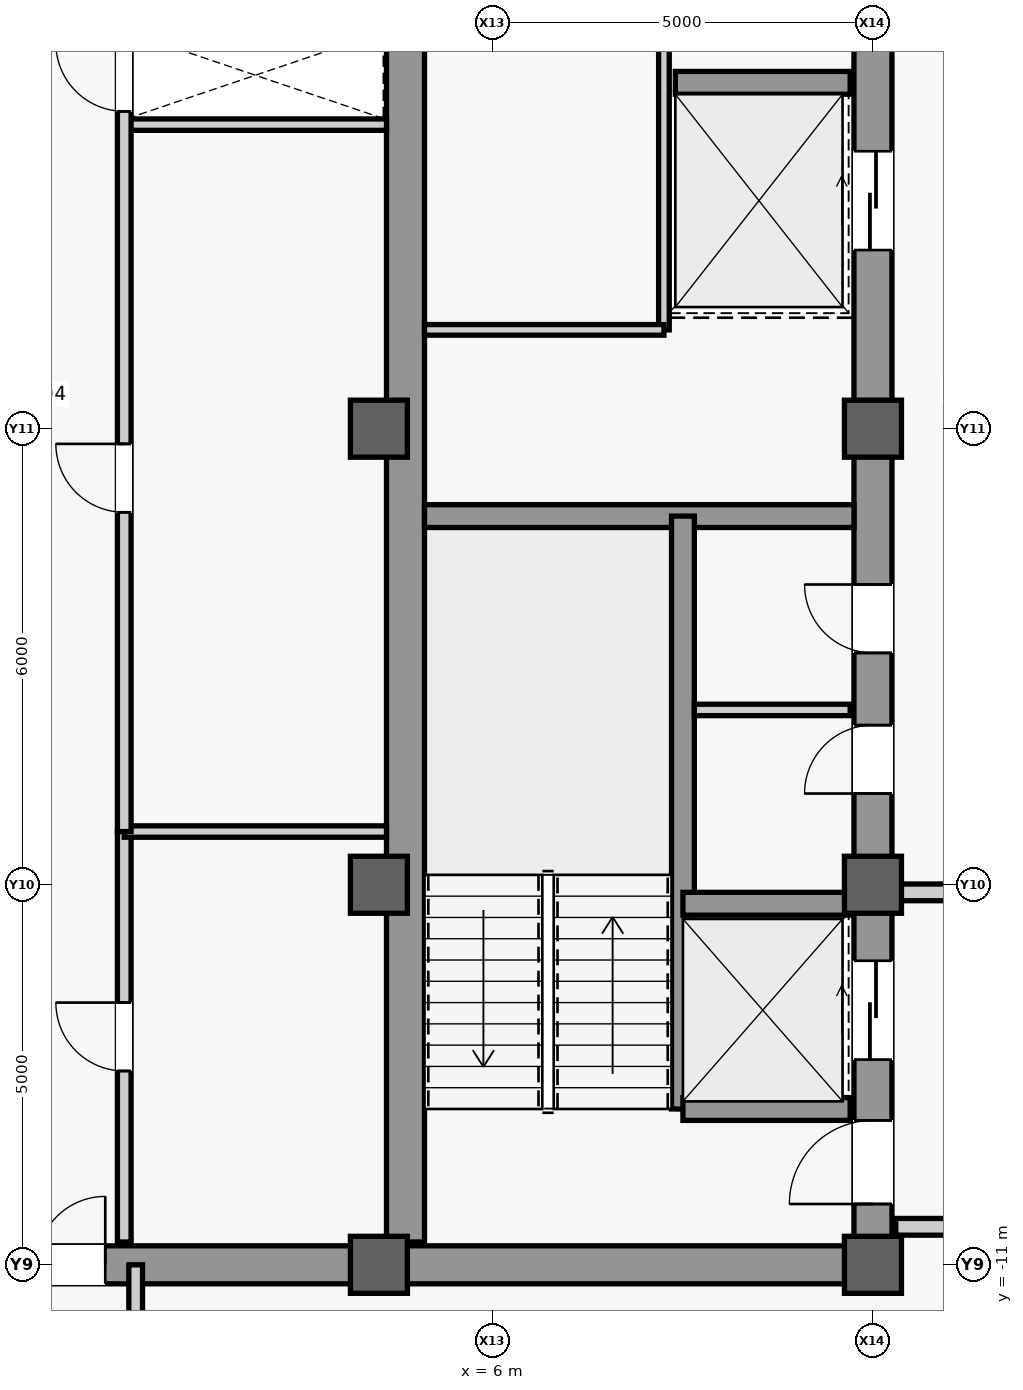
"""IFC4 building model, lengths in metres.
Left out: names, types, materials, properties, quantities, classifications, styles, units other than length and angle.
Written with IfcOpenShell. Run it as: python <this file> out.ifc"""

import sys

from ifc_helpers import new_model, si_unit, direction, frame, frame_2d, origin, origin_2d, place, context, subcontext, project, spatial, rectangle, extrude, source, transform, mapped, element, fill, save


model = new_model("IFC4")
c1 = context("Model", 3, precision=1e-05, world=origin(), true_north=direction((0.0, 1.0)))
c2 = subcontext(c1, "Body", "Model", "MODEL_VIEW")
j1 = project(units=[si_unit("LENGTHUNIT", "METRE"), si_unit("PLANEANGLEUNIT", "RADIAN")], contexts=[c1])
p1 = place(None, origin())
s1 = spatial("IfcSite", under=j1, at=p1, CompositionType="ELEMENT")
p2 = place(p1, origin())
s2 = spatial("IfcBuilding", under=s1, at=p2, CompositionType="ELEMENT")
p3 = place(p2, frame((0.0, 0.0, 330.3)))
s3 = spatial("IfcBuildingStorey", under=s2, at=p3, CompositionType="ELEMENT", Elevation=330.3)
m1 = source(origin(), c2, "Body", "SweptSolid", [
    extrude(rectangle(XDim=22.0, YDim=0.5, at=frame_2d((11.0, 0.0))), origin(), (0.0, 0.0, 1.0), 3.74),
])
p4 = place(p3, frame((11.0, -11.0, 0.0), z_axis=(0.0, 0.0, 1.0), x_axis=(0.0, 1.0, 0.0)))
e1 = element("IfcWall", 1, at=p4, inside=s3, PredefinedType="SHEAR", context=c2, shape_type="MappedRepresentation", body=[
    mapped(m1, transform((0.0, 0.0, 0.0), scale=1.0)),
])
m2 = source(origin(), c2, "Body", "SweptSolid", [
    extrude(rectangle(XDim=1.1, YDim=2.2, at=frame_2d((0.55, 1.1))), frame((0.0, 0.26, 0.0), z_axis=(0.0, -1.0, 0.0), x_axis=(1.0, 0.0, 0.0)), (0.0, 0.0, 1.0), 0.52),
])
p5 = place(p4, frame((0.8, 0.0, 0.0)))
e2 = element("IfcOpeningElement", 2, at=p5, cuts=e1, PredefinedType="OPENING", context=c2, shape_type="MappedRepresentation", body=[
    mapped(m2, transform((0.0, 0.0, 0.0), scale=1.0)),
])
m3 = source(origin(), c2, "Body", "SweptSolid", [
    extrude(rectangle(XDim=0.9, YDim=2.15, at=frame_2d((0.45, 1.075))), frame((0.0, 0.26, 0.0), z_axis=(0.0, -1.0, 0.0), x_axis=(1.0, 0.0, 0.0)), (0.0, 0.0, 1.0), 0.52),
])
p6 = place(p4, frame((6.2, 0.0, 0.0)))
e3 = element("IfcOpeningElement", 3, at=p6, cuts=e1, PredefinedType="OPENING", context=c2, shape_type="MappedRepresentation", body=[
    mapped(m3, transform((0.0, 0.0, 0.0), scale=1.0)),
])
p7 = place(p4, frame((8.05, 0.0, 0.0)))
e4 = element("IfcOpeningElement", 4, at=p7, cuts=e1, PredefinedType="OPENING", context=c2, shape_type="MappedRepresentation", body=[
    mapped(m3, transform((0.0, 0.0, 0.0), scale=1.0)),
])
m4 = source(origin(), c2, "Body", "SweptSolid", [
    extrude(rectangle(XDim=1.2, YDim=2.3, at=frame_2d((0.6, 1.15))), frame((0.0, 0.26, 0.0), z_axis=(0.0, -1.0, 0.0), x_axis=(1.0, 0.0, 0.0)), (0.0, 0.0, 1.0), 0.52),
])
p8 = place(p4, frame((17.6, 0.0, 0.0)))
e5 = element("IfcOpeningElement", 5, at=p8, cuts=e1, PredefinedType="OPENING", context=c2, shape_type="MappedRepresentation", body=[
    mapped(m4, transform((0.0, 0.0, 0.0), scale=1.0)),
])
p9 = place(p4, frame((19.6, 0.0, 0.0)))
e6 = element("IfcOpeningElement", 6, at=p9, cuts=e1, PredefinedType="OPENING", context=c2, shape_type="MappedRepresentation", body=[
    mapped(m4, transform((0.0, 0.0, 0.0), scale=1.0)),
])
m5 = source(origin(), c2, "Body", "SweptSolid", [
    extrude(rectangle(XDim=1.3, YDim=2.3, at=frame_2d((0.65, 1.15))), frame((0.0, 0.26, 0.0), z_axis=(0.0, -1.0, 0.0), x_axis=(1.0, 0.0, 0.0)), (0.0, 0.0, 1.0), 0.52),
])
p10 = place(p4, frame((2.7, 0.0, 0.0)))
e7 = element("IfcOpeningElement", 7, at=p10, cuts=e1, PredefinedType="OPENING", context=c2, shape_type="MappedRepresentation", body=[
    mapped(m5, transform((0.0, 0.0, 0.0), scale=1.0)),
])
p11 = place(p4, frame((13.35, 0.0, 0.0)))
e8 = element("IfcOpeningElement", 8, at=p11, cuts=e1, PredefinedType="OPENING", context=c2, shape_type="MappedRepresentation", body=[
    mapped(m5, transform((0.0, 0.0, 0.0), scale=1.0)),
])
m6 = source(origin(), c2, "Body", "SweptSolid", [
    extrude(rectangle(XDim=21.4, YDim=0.5, at=frame_2d((10.7, 0.0))), origin(), (0.0, 0.0, 1.0), 3.74),
])
p12 = place(p3, frame((4.85, -10.7, 0.0), z_axis=(0.0, 0.0, 1.0), x_axis=(0.0, 1.0, 0.0)))
e9 = element("IfcWall", 9, at=p12, inside=s3, PredefinedType="SHEAR", context=c2, shape_type="MappedRepresentation", body=[
    mapped(m6, transform((0.0, 0.0, 0.0), scale=1.0)),
])
m7 = source(origin(), c2, "Body", "SweptSolid", [
    extrude(rectangle(XDim=5.9, YDim=0.5, at=frame_2d((2.95, 0.0))), origin(), (0.0, 0.0, 1.0), 3.74),
])
p13 = place(p3, frame((4.85, -11.0, 0.0), z_axis=(0.0, 0.0, 1.0), x_axis=(1.0, 0.0, 0.0)))
e10 = element("IfcWall", 10, at=p13, inside=s3, PredefinedType="SHEAR", context=c2, shape_type="MappedRepresentation", body=[
    mapped(m7, transform((0.0, 0.0, 0.0), scale=1.0)),
])
m8 = source(origin(), c2, "Body", "SweptSolid", [
    extrude(rectangle(XDim=5.65, YDim=0.3, at=frame_2d((2.825, 0.0))), origin(), (0.0, 0.0, 1.0), 3.74),
])
p14 = place(p3, frame((5.1, -1.15, 0.0), z_axis=(0.0, 0.0, 1.0), x_axis=(1.0, 0.0, 0.0)))
e11 = element("IfcWall", 11, at=p14, inside=s3, PredefinedType="SHEAR", context=c2, shape_type="MappedRepresentation", body=[
    mapped(m8, transform((0.0, 0.0, 0.0), scale=1.0)),
])
m9 = source(origin(), c2, "Body", "SweptSolid", [
    extrude(rectangle(XDim=9.2, YDim=0.5, at=frame_2d((4.6, 0.0))), origin(), (0.0, 0.0, 1.0), 3.74),
])
p15 = place(p3, frame((-4.6, -11.0, 0.0), z_axis=(0.0, 0.0, 1.0), x_axis=(1.0, 0.0, 0.0)))
e12 = element("IfcWall", 12, at=p15, inside=s3, PredefinedType="SHEAR", context=c2, shape_type="MappedRepresentation", body=[
    mapped(m9, transform((0.0, 0.0, 0.0), scale=1.0)),
])
m10 = source(origin(), c2, "Body", "SweptSolid", [
    extrude(rectangle(XDim=1.8, YDim=2.25, at=frame_2d((0.9, 1.125))), frame((0.0, 0.26, 0.0), z_axis=(0.0, -1.0, 0.0), x_axis=(1.0, 0.0, 0.0)), (0.0, 0.0, 1.0), 0.52),
])
p16 = place(p15, frame((3.7, 0.0, 0.0)))
e13 = element("IfcOpeningElement", 13, at=p16, cuts=e12, PredefinedType="OPENING", context=c2, shape_type="MappedRepresentation", body=[
    mapped(m10, transform((0.0, 0.0, 0.0), scale=1.0)),
])
m11 = source(origin(), c2, "Body", "SweptSolid", [
    extrude(rectangle(XDim=0.75, YDim=0.75, at=origin_2d()), origin(), (0.0, 0.0, 1.0), 4.0),
])
for number, where, z_axis, x_axis in (
    (14, (4.5, -11.0, 0.0), (0.0, 0.0, 1.0), (1.0, 0.0, 0.0)),
    (15, (4.5, -6.0, 0.0), (0.0, 0.0, 1.0), (1.0, 0.0, 0.0)),
    (16, (4.5, 0.0, 0.0), (0.0, 0.0, 1.0), (1.0, 0.0, 0.0)),
    (17, (11.0, -11.0, 0.0), (0.0, 0.0, 1.0), (1.0, 0.0, 0.0)),
    (18, (11.0, -6.0, 0.0), (0.0, 0.0, 1.0), (1.0, 0.0, 0.0)),
    (19, (11.0, 0.0, 0.0), (0.0, 0.0, 1.0), (1.0, 0.0, 0.0)),
):
    element("IfcColumn", number, at=place(p3, frame(where, z_axis=z_axis, x_axis=x_axis)), inside=s3, PredefinedType="COLUMN", context=c2, shape_type="MappedRepresentation", body=[
        mapped(m11, transform((0.0, 0.0, 0.0), scale=1.0)),
    ])
m12 = source(origin(), c2, "Body", "SweptSolid", [
    extrude(rectangle(XDim=7.8, YDim=0.3, at=frame_2d((3.9, 0.0))), origin(), (0.0, 0.0, 1.0), 3.74),
])
p17 = place(p3, frame((8.5, -8.95, 0.0), z_axis=(0.0, 0.0, 1.0), x_axis=(0.0, 1.0, 0.0)))
e20 = element("IfcWall", 20, at=p17, inside=s3, PredefinedType="SHEAR", context=c2, shape_type="MappedRepresentation", body=[
    mapped(m12, transform((0.0, 0.0, 0.0), scale=1.0)),
])
m13 = source(origin(), c2, "Body", "SweptSolid", [
    extrude(rectangle(XDim=2.2, YDim=0.3, at=frame_2d((1.1, 0.0))), origin(), (0.0, 0.0, 1.0), 3.74),
])
for number, where, z_axis, x_axis in (
    (21, (8.5, -8.95, 0.0), (0.0, 0.0, 1.0), (1.0, 0.0, 0.0)),
    (22, (8.5, -6.25, 0.0), (0.0, 0.0, 1.0), (1.0, 0.0, 0.0)),
):
    element("IfcWall", number, at=place(p3, frame(where, z_axis=z_axis, x_axis=x_axis)), inside=s3, PredefinedType="SHEAR", context=c2, shape_type="MappedRepresentation", body=[
        mapped(m13, transform((0.0, 0.0, 0.0), scale=1.0)),
    ])
m14 = source(origin(), c2, "Body", "SweptSolid", [
    extrude(rectangle(XDim=2.3, YDim=0.3, at=frame_2d((1.15, 0.0))), origin(), (0.0, 0.0, 1.0), 3.74),
])
p18 = place(p3, frame((8.4, 4.55, 0.0), z_axis=(0.0, 0.0, 1.0), x_axis=(1.0, 0.0, 0.0)))
e23 = element("IfcWall", 23, at=p18, inside=s3, PredefinedType="SHEAR", context=c2, shape_type="MappedRepresentation", body=[
    mapped(m14, transform((0.0, 0.0, 0.0), scale=1.0)),
])
m15 = source(origin(), c2, "Body", "SweptSolid", [
    extrude(rectangle(XDim=2.05, YDim=0.15, at=frame_2d((1.025, 0.0))), origin(), (0.0, 0.0, 1.0), 3.74),
])
p19 = place(p3, frame((8.65, -3.7, 0.0), z_axis=(0.0, 0.0, 1.0), x_axis=(1.0, 0.0, 0.0)))
e24 = element("IfcWall", 24, at=p19, inside=s3, PredefinedType="PARTITIONING", context=c2, shape_type="MappedRepresentation", body=[
    mapped(m15, transform((0.0, 0.0, 0.0), scale=1.0)),
])
m16 = source(origin(), c2, "Body", "SweptSolid", [
    extrude(rectangle(XDim=9.4, YDim=0.14, at=frame_2d((4.7, 0.0))), origin(), (0.0, 0.0, 1.0), 3.74),
])
p20 = place(p3, frame((8.25, 1.3, 0.0), z_axis=(0.0, 0.0, 1.0), x_axis=(0.0, 1.0, 0.0)))
e25 = element("IfcWall", 25, at=p20, inside=s3, PredefinedType="PARTITIONING", context=c2, shape_type="MappedRepresentation", body=[
    mapped(m16, transform((0.0, 0.0, 0.0), scale=1.0)),
])
m17 = source(origin(), c2, "Body", "SweptSolid", [
    extrude(rectangle(XDim=3.15, YDim=0.14, at=frame_2d((1.575, 0.0))), origin(), (0.0, 0.0, 1.0), 3.74),
])
p21 = place(p3, frame((5.1, 1.3, 0.0), z_axis=(0.0, 0.0, 1.0), x_axis=(1.0, 0.0, 0.0)))
e26 = element("IfcWall", 26, at=p21, inside=s3, PredefinedType="PARTITIONING", context=c2, shape_type="MappedRepresentation", body=[
    mapped(m17, transform((0.0, 0.0, 0.0), scale=1.0)),
])
m18 = source(origin(), c2, "Body", "SweptSolid", [
    extrude(rectangle(XDim=4.05, YDim=0.22, at=frame_2d((2.025, 0.0))), origin(), (0.0, 0.0, 1.0), 3.74),
])
p22 = place(p3, frame((11.3, -10.5, 0.0), z_axis=(0.0, 0.0, 1.0), x_axis=(1.0, 0.0, 0.0)))
e27 = element("IfcWall", 27, at=p22, inside=s3, PredefinedType="PARTITIONING", context=c2, shape_type="MappedRepresentation", body=[
    mapped(m18, transform((0.0, 0.0, 0.0), scale=1.0)),
])
m19 = source(origin(), c2, "Body", "SweptSolid", [
    extrude(rectangle(XDim=4.05, YDim=0.22, at=frame_2d((2.025, 0.0))), origin(), (0.0, 0.0, 1.0), 3.124),
])
p23 = place(p3, frame((11.3, -6.1, 0.0), z_axis=(0.0, 0.0, 1.0), x_axis=(1.0, 0.0, 0.0)))
e28 = element("IfcWall", 28, at=p23, inside=s3, PredefinedType="PARTITIONING", context=c2, shape_type="MappedRepresentation", body=[
    mapped(m19, transform((0.0, 0.0, 0.0), scale=1.0)),
])
m20 = source(origin(), c2, "Body", "SweptSolid", [
    extrude(rectangle(XDim=3.45, YDim=0.15, at=frame_2d((1.725, 0.0))), origin(), (0.0, 0.0, 1.0), 3.74),
])
p24 = place(p3, frame((1.15, 4.0, 0.0), z_axis=(0.0, 0.0, 1.0), x_axis=(1.0, 0.0, 0.0)))
e29 = element("IfcWall", 29, at=p24, inside=s3, PredefinedType="PARTITIONING", context=c2, shape_type="MappedRepresentation", body=[
    mapped(m20, transform((0.0, 0.0, 0.0), scale=1.0)),
])
m21 = source(origin(), c2, "Body", "SweptSolid", [
    extrude(rectangle(XDim=5.4, YDim=0.18, at=frame_2d((2.7, 0.0))), origin(), (0.0, 0.0, 1.0), 3.74),
])
p25 = place(p3, frame((1.15, -10.7, 0.0), z_axis=(0.0, 0.0, 1.0), x_axis=(0.0, 1.0, 0.0)))
e30 = element("IfcWall", 30, at=p25, inside=s3, PredefinedType="PARTITIONING", context=c2, shape_type="MappedRepresentation", body=[
    mapped(m21, transform((0.0, 0.0, 0.0), scale=1.0)),
])
m22 = source(origin(), c2, "Body", "SweptSolid", [
    extrude(rectangle(XDim=0.9, YDim=2.15, at=frame_2d((0.45, 1.075))), frame((0.0, 0.1, 0.0), z_axis=(0.0, -1.0, 0.0), x_axis=(1.0, 0.0, 0.0)), (0.0, 0.0, 1.0), 0.2),
])
p26 = place(p25, frame((2.25, 0.0, 0.0)))
e31 = element("IfcOpeningElement", 31, at=p26, cuts=e30, PredefinedType="OPENING", context=c2, shape_type="MappedRepresentation", body=[
    mapped(m22, transform((0.0, 0.0, 0.0), scale=1.0)),
])
p27 = place(p3, frame((1.15, -5.3, 0.0), z_axis=(0.0, 0.0, 1.0), x_axis=(1.0, 0.0, 0.0)))
e32 = element("IfcWall", 32, at=p27, inside=s3, PredefinedType="PARTITIONING", context=c2, shape_type="MappedRepresentation", body=[
    mapped(m20, transform((0.0, 0.0, 0.0), scale=1.0)),
])
m23 = source(origin(), c2, "Body", "SweptSolid", [
    extrude(rectangle(XDim=10.6, YDim=0.18, at=frame_2d((5.3, 0.0))), origin(), (0.0, 0.0, 1.0), 3.74),
])
p28 = place(p3, frame((1.15, -5.3, 0.0), z_axis=(0.0, 0.0, 1.0), x_axis=(0.0, 1.0, 0.0)))
e33 = element("IfcWall", 33, at=p28, inside=s3, PredefinedType="PARTITIONING", context=c2, shape_type="MappedRepresentation", body=[
    mapped(m23, transform((0.0, 0.0, 0.0), scale=1.0)),
])
p29 = place(p28, frame((4.2, 0.0, 0.0)))
e34 = element("IfcOpeningElement", 34, at=p29, cuts=e33, PredefinedType="OPENING", context=c2, shape_type="MappedRepresentation", body=[
    mapped(m22, transform((0.0, 0.0, 0.0), scale=1.0)),
])
p30 = place(p28, frame((9.475, 0.0, 0.0)))
e35 = element("IfcOpeningElement", 35, at=p30, cuts=e33, PredefinedType="OPENING", context=c2, shape_type="MappedRepresentation", body=[
    mapped(m22, transform((0.0, 0.0, 0.0), scale=1.0)),
])
m24 = source(origin(), c2, "Body", "SweptSolid", [
    extrude(rectangle(XDim=3.2, YDim=0.18, at=frame_2d((1.6, 0.0))), origin(), (0.0, 0.0, 1.0), 3.74),
])
p31 = place(p3, frame((1.3, -14.2, 0.0), z_axis=(0.0, 0.0, 1.0), x_axis=(0.0, 1.0, 0.0)))
e36 = element("IfcWall", 36, at=p31, inside=s3, PredefinedType="PARTITIONING", context=c2, shape_type="MappedRepresentation", body=[
    mapped(m24, transform((0.0, 0.0, 0.0), scale=1.0)),
])
m25 = source(origin(), c2, "Body", "SweptSolid", [
    extrude(rectangle(XDim=1.1, YDim=2.2, at=frame_2d((0.55, 1.1))), frame((0.0, 0.025, 0.0), z_axis=(0.0, -1.0, 0.0), x_axis=(1.0, 0.0, 0.0)), (0.0, 0.0, 1.0), 0.05),
])
p32 = place(p5, origin())
e37 = element("IfcDoor", 37, at=p32, inside=s3, OperationType="SINGLE_SWING_LEFT", PredefinedType="DOOR", context=c2, shape_type="MappedRepresentation", body=[
    mapped(m25, transform((0.0, 0.0, 0.0), scale=1.0)),
])
fill(e2, e37)
m26 = source(origin(), c2, "Body", "SweptSolid", [
    extrude(rectangle(XDim=0.9, YDim=2.15, at=frame_2d((0.45, 1.075))), frame((0.0, 0.025, 0.0), z_axis=(0.0, -1.0, 0.0), x_axis=(1.0, 0.0, 0.0)), (0.0, 0.0, 1.0), 0.05),
])
p33 = place(p6, origin())
e38 = element("IfcDoor", 38, at=p33, inside=s3, OperationType="SINGLE_SWING_LEFT", PredefinedType="DOOR", context=c2, shape_type="MappedRepresentation", body=[
    mapped(m26, transform((0.0, 0.0, 0.0), scale=1.0)),
])
fill(e3, e38)
p34 = place(p7, origin())
e39 = element("IfcDoor", 39, at=p34, inside=s3, OperationType="SINGLE_SWING_RIGHT", PredefinedType="DOOR", context=c2, shape_type="MappedRepresentation", body=[
    mapped(m26, transform((0.0, 0.0, 0.0), scale=1.0)),
])
fill(e4, e39)
p35 = place(p26, origin())
e40 = element("IfcDoor", 40, at=p35, inside=s3, OperationType="SINGLE_SWING_RIGHT", PredefinedType="DOOR", context=c2, shape_type="MappedRepresentation", body=[
    mapped(m26, transform((0.0, 0.0, 0.0), scale=1.0)),
])
fill(e31, e40)
m27 = source(origin(), c2, "Body", "SweptSolid", [
    extrude(rectangle(XDim=1.8, YDim=2.25, at=frame_2d((0.9, 1.125))), frame((0.0, 0.025, 0.0), z_axis=(0.0, -1.0, 0.0), x_axis=(1.0, 0.0, 0.0)), (0.0, 0.0, 1.0), 0.05),
])
p36 = place(p16, origin())
e41 = element("IfcDoor", 41, at=p36, inside=s3, OperationType="SINGLE_SWING_LEFT", PredefinedType="DOOR", context=c2, shape_type="MappedRepresentation", body=[
    mapped(m27, transform((0.0, 0.0, 0.0), scale=1.0)),
])
fill(e13, e41)
p37 = place(p29, origin())
e42 = element("IfcDoor", 42, at=p37, inside=s3, OperationType="SINGLE_SWING_RIGHT", PredefinedType="DOOR", context=c2, shape_type="MappedRepresentation", body=[
    mapped(m26, transform((0.0, 0.0, 0.0), scale=1.0)),
])
fill(e34, e42)
p38 = place(p30, origin())
e43 = element("IfcDoor", 43, at=p38, inside=s3, OperationType="SINGLE_SWING_RIGHT", PredefinedType="DOOR", context=c2, shape_type="MappedRepresentation", body=[
    mapped(m26, transform((0.0, 0.0, 0.0), scale=1.0)),
])
fill(e35, e43)
m28 = source(origin(), c2, "Body", "SweptSolid", [
    extrude(rectangle(XDim=1.3, YDim=2.3, at=frame_2d((0.65, 1.15))), frame((0.0, 0.025, 0.0), z_axis=(0.0, -1.0, 0.0), x_axis=(1.0, 0.0, 0.0)), (0.0, 0.0, 1.0), 0.05),
])
p39 = place(p10, origin())
e44 = element("IfcDoor", 44, at=p39, inside=s3, OperationType="SLIDING_TO_LEFT", PredefinedType="DOOR", context=c2, shape_type="MappedRepresentation", body=[
    mapped(m28, transform((0.0, 0.0, 0.0), scale=1.0)),
])
fill(e7, e44)
p40 = place(p11, origin())
e45 = element("IfcDoor", 45, at=p40, inside=s3, OperationType="SLIDING_TO_LEFT", PredefinedType="DOOR", context=c2, shape_type="MappedRepresentation", body=[
    mapped(m28, transform((0.0, 0.0, 0.0), scale=1.0)),
])
fill(e8, e45)
save(model, sys.argv[1])
